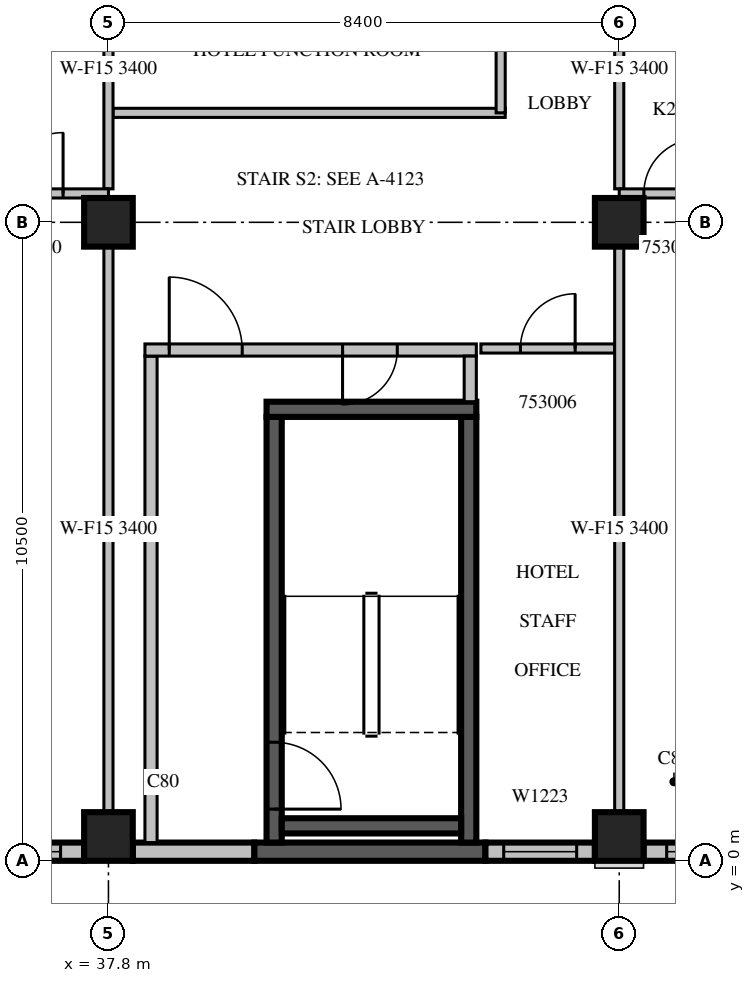
"""IFC4 building model, lengths in metres.
Left out: names, types, materials, properties, quantities, classifications, styles, units other than length and angle.
Written with IfcOpenShell. Run it as: python <this file> out.ifc"""

import sys

from ifc_helpers import new_model, si_unit, direction, frame, frame_2d, origin, origin_2d, place, context, subcontext, project, spatial, rectangle, extrude, source, transform, mapped, element, fill, save


model = new_model("IFC4")
c1 = context("Model", 3, precision=1e-05, world=origin(), true_north=direction((0.0, 1.0)))
c2 = subcontext(c1, "Body", "Model", "MODEL_VIEW")
j1 = project(units=[si_unit("LENGTHUNIT", "METRE"), si_unit("PLANEANGLEUNIT", "RADIAN")], contexts=[c1])
p1 = place(None, origin())
s1 = spatial("IfcSite", under=j1, at=p1, CompositionType="ELEMENT")
p2 = place(p1, origin())
s2 = spatial("IfcBuilding", under=s1, at=p2, CompositionType="ELEMENT")
p3 = place(p2, frame((0.0, 0.0, 234.8)))
s3 = spatial("IfcBuildingStorey", under=s2, at=p3, CompositionType="ELEMENT", Elevation=234.8)
m1 = source(origin(), c2, "Body", "SweptSolid", [
    extrude(rectangle(XDim=0.8, YDim=0.8, at=origin_2d()), origin(), (0.0, 0.0, 1.0), 3.8),
])
for number, where, z_axis, x_axis in (
    (1, (37.8, 0.4, 0.0), (0.0, 0.0, 1.0), (1.0, 0.0, 0.0)),
    (2, (46.2, 0.4, 0.0), (0.0, 0.0, 1.0), (1.0, 0.0, 0.0)),
    (3, (37.8, 10.5, 0.0), (0.0, 0.0, 1.0), (1.0, 0.0, 0.0)),
    (4, (46.2, 10.5, 0.0), (0.0, 0.0, 1.0), (1.0, 0.0, 0.0)),
):
    element("IfcColumn", number, at=place(p3, frame(where, z_axis=z_axis, x_axis=x_axis)), inside=s3, PredefinedType="COLUMN", context=c2, shape_type="MappedRepresentation", body=[
        mapped(m1, transform((0.0, 0.0, 0.0), scale=1.0)),
    ])
m2 = source(origin(), c2, "Body", "SweptSolid", [
    extrude(rectangle(XDim=7.6, YDim=0.3, at=frame_2d((3.8, 0.0))), origin(), (0.0, 0.0, 1.0), 3.4),
])
p4 = place(p3, frame((29.8, 0.15, 0.0), z_axis=(0.0, 0.0, 1.0), x_axis=(1.0, 0.0, 0.0)))
e5 = element("IfcWall", 5, at=p4, inside=s3, PredefinedType="STANDARD", context=c2, shape_type="MappedRepresentation", body=[
    mapped(m2, transform((0.0, 0.0, 0.0), scale=1.0)),
])
m3 = source(origin(), c2, "Body", "SweptSolid", [
    extrude(rectangle(XDim=1.2, YDim=2.3, at=frame_2d((0.6, 1.15))), frame((0.0, 0.16, 0.0), z_axis=(0.0, -1.0, 0.0), x_axis=(1.0, 0.0, 0.0)), (0.0, 0.0, 1.0), 0.32),
])
p5 = place(p4, frame((0.487, 0.0, 0.6)))
e6 = element("IfcOpeningElement", 6, at=p5, cuts=e5, PredefinedType="OPENING", context=c2, shape_type="MappedRepresentation", body=[
    mapped(m3, transform((0.0, 0.0, 0.0), scale=1.0)),
])
p6 = place(p4, frame((6.013, 0.0, 0.6)))
e7 = element("IfcOpeningElement", 7, at=p6, cuts=e5, PredefinedType="OPENING", context=c2, shape_type="MappedRepresentation", body=[
    mapped(m3, transform((0.0, 0.0, 0.0), scale=1.0)),
])
m4 = source(origin(), c2, "Body", "SweptSolid", [
    extrude(rectangle(XDim=2.4, YDim=2.3, at=frame_2d((1.2, 1.15))), frame((0.0, 0.16, 0.0), z_axis=(0.0, -1.0, 0.0), x_axis=(1.0, 0.0, 0.0)), (0.0, 0.0, 1.0), 0.32),
])
p7 = place(p4, frame((2.65, 0.0, 0.6)))
e8 = element("IfcOpeningElement", 8, at=p7, cuts=e5, PredefinedType="OPENING", context=c2, shape_type="MappedRepresentation", body=[
    mapped(m4, transform((0.0, 0.0, 0.0), scale=1.0)),
])
m5 = source(origin(), c2, "Body", "SweptSolid", [
    extrude(rectangle(XDim=2.0, YDim=0.3, at=frame_2d((1.0, 0.0))), origin(), (0.0, 0.0, 1.0), 3.4),
])
p8 = place(p3, frame((38.2, 0.15, 0.0), z_axis=(0.0, 0.0, 1.0), x_axis=(1.0, 0.0, 0.0)))
e9 = element("IfcWall", 9, at=p8, inside=s3, PredefinedType="STANDARD", context=c2, shape_type="MappedRepresentation", body=[
    mapped(m5, transform((0.0, 0.0, 0.0), scale=1.0)),
])
m6 = source(origin(), c2, "Body", "SweptSolid", [
    extrude(rectangle(XDim=3.8, YDim=0.3, at=frame_2d((1.9, 0.0))), origin(), (0.0, 0.0, 1.0), 3.4),
])
p9 = place(p3, frame((40.2, 0.15, 0.0), z_axis=(0.0, 0.0, 1.0), x_axis=(1.0, 0.0, 0.0)))
e10 = element("IfcWall", 10, at=p9, inside=s3, PredefinedType="SOLIDWALL", context=c2, shape_type="MappedRepresentation", body=[
    mapped(m6, transform((0.0, 0.0, 0.0), scale=1.0)),
])
m7 = source(origin(), c2, "Body", "SweptSolid", [
    extrude(rectangle(XDim=1.8, YDim=0.3, at=frame_2d((0.9, 0.0))), origin(), (0.0, 0.0, 1.0), 3.4),
])
p10 = place(p3, frame((44.0, 0.15, 0.0), z_axis=(0.0, 0.0, 1.0), x_axis=(1.0, 0.0, 0.0)))
e11 = element("IfcWall", 11, at=p10, inside=s3, PredefinedType="STANDARD", context=c2, shape_type="MappedRepresentation", body=[
    mapped(m7, transform((0.0, 0.0, 0.0), scale=1.0)),
])
p11 = place(p10, frame((0.3, 0.0, 0.6)))
e12 = element("IfcOpeningElement", 12, at=p11, cuts=e11, PredefinedType="OPENING", context=c2, shape_type="MappedRepresentation", body=[
    mapped(m3, transform((0.0, 0.0, 0.0), scale=1.0)),
])
m8 = source(origin(), c2, "Body", "SweptSolid", [
    extrude(rectangle(XDim=2.96, YDim=0.3, at=frame_2d((1.48, 0.0))), origin(), (0.0, 0.0, 1.0), 3.4),
])
p12 = place(p3, frame((46.6, 0.15, 0.0), z_axis=(0.0, 0.0, 1.0), x_axis=(1.0, 0.0, 0.0)))
e13 = element("IfcWall", 13, at=p12, inside=s3, PredefinedType="STANDARD", context=c2, shape_type="MappedRepresentation", body=[
    mapped(m8, transform((0.0, 0.0, 0.0), scale=1.0)),
])
m9 = source(origin(), c2, "Body", "SweptSolid", [
    extrude(rectangle(XDim=1.8, YDim=2.3, at=frame_2d((0.9, 1.15))), frame((0.0, 0.16, 0.0), z_axis=(0.0, -1.0, 0.0), x_axis=(1.0, 0.0, 0.0)), (0.0, 0.0, 1.0), 0.32),
])
p13 = place(p12, frame((0.38, 0.0, 0.6)))
e14 = element("IfcOpeningElement", 14, at=p13, cuts=e13, PredefinedType="OPENING", context=c2, shape_type="MappedRepresentation", body=[
    mapped(m9, transform((0.0, 0.0, 0.0), scale=1.0)),
])
m10 = source(origin(), c2, "Body", "SweptSolid", [
    extrude(rectangle(XDim=7.0, YDim=0.25, at=frame_2d((3.5, 0.0))), origin(), (0.0, 0.0, 1.0), 3.4),
])
p14 = place(p3, frame((40.525, 0.3, 0.0), z_axis=(0.0, 0.0, 1.0), x_axis=(0.0, 1.0, 0.0)))
e15 = element("IfcWall", 15, at=p14, inside=s3, PredefinedType="SOLIDWALL", context=c2, shape_type="MappedRepresentation", body=[
    mapped(m10, transform((0.0, 0.0, 0.0), scale=1.0)),
])
m11 = source(origin(), c2, "Body", "SweptSolid", [
    extrude(rectangle(XDim=1.1, YDim=2.1, at=frame_2d((0.55, 1.05))), frame((0.0, 0.135, 0.0), z_axis=(0.0, -1.0, 0.0), x_axis=(1.0, 0.0, 0.0)), (0.0, 0.0, 1.0), 0.27),
])
p15 = place(p14, frame((0.55, 0.0, 0.0)))
e16 = element("IfcOpeningElement", 16, at=p15, cuts=e15, PredefinedType="OPENING", context=c2, shape_type="MappedRepresentation", body=[
    mapped(m11, transform((0.0, 0.0, 0.0), scale=1.0)),
])
p16 = place(p3, frame((43.725, 0.3, 0.0), z_axis=(0.0, 0.0, 1.0), x_axis=(0.0, 1.0, 0.0)))
e17 = element("IfcWall", 17, at=p16, inside=s3, PredefinedType="SOLIDWALL", context=c2, shape_type="MappedRepresentation", body=[
    mapped(m10, transform((0.0, 0.0, 0.0), scale=1.0)),
])
m12 = source(origin(), c2, "Body", "SweptSolid", [
    extrude(rectangle(XDim=3.45, YDim=0.25, at=frame_2d((1.725, 0.0))), origin(), (0.0, 0.0, 1.0), 3.4),
])
p17 = place(p3, frame((40.4, 7.425, 0.0), z_axis=(0.0, 0.0, 1.0), x_axis=(1.0, 0.0, 0.0)))
e18 = element("IfcWall", 18, at=p17, inside=s3, PredefinedType="SOLIDWALL", context=c2, shape_type="MappedRepresentation", body=[
    mapped(m12, transform((0.0, 0.0, 0.0), scale=1.0)),
])
m13 = source(origin(), c2, "Body", "SweptSolid", [
    extrude(rectangle(XDim=2.95, YDim=0.25, at=frame_2d((1.475, 0.0))), origin(), (0.0, 0.0, 1.0), 3.4),
])
p18 = place(p3, frame((40.65, 0.575, 0.0), z_axis=(0.0, 0.0, 1.0), x_axis=(1.0, 0.0, 0.0)))
e19 = element("IfcWall", 19, at=p18, inside=s3, PredefinedType="SOLIDWALL", context=c2, shape_type="MappedRepresentation", body=[
    mapped(m13, transform((0.0, 0.0, 0.0), scale=1.0)),
])
m14 = source(origin(), c2, "Body", "SweptSolid", [
    extrude(rectangle(XDim=8.0, YDim=0.2, at=frame_2d((4.0, 0.0))), origin(), (0.0, 0.0, 1.0), 3.4),
])
p19 = place(p3, frame((38.5, 0.3, 0.0), z_axis=(0.0, 0.0, 1.0), x_axis=(0.0, 1.0, 0.0)))
e20 = element("IfcWall", 20, at=p19, inside=s3, PredefinedType="PARTITIONING", context=c2, shape_type="MappedRepresentation", body=[
    mapped(m14, transform((0.0, 0.0, 0.0), scale=1.0)),
])
m15 = source(origin(), c2, "Body", "SweptSolid", [
    extrude(rectangle(XDim=5.45, YDim=0.2, at=frame_2d((2.725, 0.0))), origin(), (0.0, 0.0, 1.0), 3.4),
])
p20 = place(p3, frame((38.4, 8.4, 0.0), z_axis=(0.0, 0.0, 1.0), x_axis=(1.0, 0.0, 0.0)))
e21 = element("IfcWall", 21, at=p20, inside=s3, PredefinedType="PARTITIONING", context=c2, shape_type="MappedRepresentation", body=[
    mapped(m15, transform((0.0, 0.0, 0.0), scale=1.0)),
])
m16 = source(origin(), c2, "Body", "SweptSolid", [
    extrude(rectangle(XDim=1.2, YDim=2.1, at=frame_2d((0.6, 1.05))), frame((0.0, 0.11, 0.0), z_axis=(0.0, -1.0, 0.0), x_axis=(1.0, 0.0, 0.0)), (0.0, 0.0, 1.0), 0.22),
])
p21 = place(p20, frame((0.4, 0.0, 0.0)))
e22 = element("IfcOpeningElement", 22, at=p21, cuts=e21, PredefinedType="OPENING", context=c2, shape_type="MappedRepresentation", body=[
    mapped(m16, transform((0.0, 0.0, 0.0), scale=1.0)),
])
m17 = source(origin(), c2, "Body", "SweptSolid", [
    extrude(rectangle(XDim=0.9, YDim=2.1, at=frame_2d((0.45, 1.05))), frame((0.0, 0.11, 0.0), z_axis=(0.0, -1.0, 0.0), x_axis=(1.0, 0.0, 0.0)), (0.0, 0.0, 1.0), 0.22),
])
p22 = place(p20, frame((3.25, 0.0, 0.0)))
e23 = element("IfcOpeningElement", 23, at=p22, cuts=e21, PredefinedType="OPENING", context=c2, shape_type="MappedRepresentation", body=[
    mapped(m17, transform((0.0, 0.0, 0.0), scale=1.0)),
])
m18 = source(origin(), c2, "Body", "SweptSolid", [
    extrude(rectangle(XDim=0.75, YDim=0.2, at=frame_2d((0.375, 0.0))), origin(), (0.0, 0.0, 1.0), 3.4),
])
p23 = place(p3, frame((43.75, 7.55, 0.0), z_axis=(0.0, 0.0, 1.0), x_axis=(0.0, 1.0, 0.0)))
e24 = element("IfcWall", 24, at=p23, inside=s3, PredefinedType="PARTITIONING", context=c2, shape_type="MappedRepresentation", body=[
    mapped(m18, transform((0.0, 0.0, 0.0), scale=1.0)),
])
m19 = source(origin(), c2, "Body", "SweptSolid", [
    extrude(rectangle(XDim=6.45, YDim=0.15, at=frame_2d((3.225, 0.0))), origin(), (0.0, 0.0, 1.0), 3.4),
])
p24 = place(p3, frame((37.875, 12.3, 0.0), z_axis=(0.0, 0.0, 1.0), x_axis=(1.0, 0.0, 0.0)))
e25 = element("IfcWall", 25, at=p24, inside=s3, PredefinedType="PARTITIONING", context=c2, shape_type="MappedRepresentation", body=[
    mapped(m19, transform((0.0, 0.0, 0.0), scale=1.0)),
])
m20 = source(origin(), c2, "Body", "SweptSolid", [
    extrude(rectangle(XDim=2.775, YDim=0.15, at=frame_2d((1.387, 0.0))), origin(), (0.0, 0.0, 1.0), 3.4),
])
p25 = place(p3, frame((44.25, 12.3, 0.0), z_axis=(0.0, 0.0, 1.0), x_axis=(0.0, 1.0, 0.0)))
e26 = element("IfcWall", 26, at=p25, inside=s3, PredefinedType="PARTITIONING", context=c2, shape_type="MappedRepresentation", body=[
    mapped(m20, transform((0.0, 0.0, 0.0), scale=1.0)),
])
m21 = source(origin(), c2, "Body", "SweptSolid", [
    extrude(rectangle(XDim=2.2, YDim=0.15, at=frame_2d((1.1, 0.0))), origin(), (0.0, 0.0, 1.0), 3.4),
])
p26 = place(p3, frame((46.125, 8.425, 0.0), z_axis=(0.0, 0.0, 1.0), x_axis=(-1.0, 0.0, 0.0)))
e27 = element("IfcWall", 27, at=p26, inside=s3, PredefinedType="PARTITIONING", context=c2, shape_type="MappedRepresentation", body=[
    mapped(m21, transform((0.0, 0.0, 0.0), scale=1.0)),
])
m22 = source(origin(), c2, "Body", "SweptSolid", [
    extrude(rectangle(XDim=0.9, YDim=2.1, at=frame_2d((0.45, 1.05))), frame((0.0, 0.085, 0.0), z_axis=(0.0, -1.0, 0.0), x_axis=(1.0, 0.0, 0.0)), (0.0, 0.0, 1.0), 0.17),
])
p27 = place(p26, frame((0.65, 0.0, 0.0)))
e28 = element("IfcOpeningElement", 28, at=p27, cuts=e27, PredefinedType="OPENING", context=c2, shape_type="MappedRepresentation", body=[
    mapped(m22, transform((0.0, 0.0, 0.0), scale=1.0)),
])
m23 = source(origin(), c2, "Body", "SweptSolid", [
    extrude(rectangle(XDim=9.302, YDim=0.15, at=frame_2d((4.651, 0.0))), origin(), (0.0, 0.0, 1.0), 3.4),
])
p28 = place(p3, frame((37.8, 0.799, 0.0), z_axis=(0.0, 0.0, 1.0), x_axis=(0.0, 1.0, 0.0)))
e29 = element("IfcWall", 29, at=p28, inside=s3, PredefinedType="PARTITIONING", context=c2, shape_type="MappedRepresentation", body=[
    mapped(m23, transform((0.0, 0.0, 0.0), scale=1.0)),
])
m24 = source(origin(), c2, "Body", "SweptSolid", [
    extrude(rectangle(XDim=3.95, YDim=0.15, at=frame_2d((1.975, 0.0))), origin(), (0.0, 0.0, 1.0), 3.4),
])
p29 = place(p3, frame((37.8, 11.05, 0.0), z_axis=(0.0, 0.0, 1.0), x_axis=(0.0, 1.0, 0.0)))
e30 = element("IfcWall", 30, at=p29, inside=s3, PredefinedType="PARTITIONING", context=c2, shape_type="MappedRepresentation", body=[
    mapped(m24, transform((0.0, 0.0, 0.0), scale=1.0)),
])
m25 = source(origin(), c2, "Body", "SweptSolid", [
    extrude(rectangle(XDim=8.4, YDim=0.15, at=frame_2d((4.2, 0.0))), origin(), (0.0, 0.0, 1.0), 3.4),
])
p30 = place(p3, frame((37.8, 10.975, 0.0), z_axis=(0.0, 0.0, 1.0), x_axis=(-1.0, 0.0, 0.0)))
e31 = element("IfcWall", 31, at=p30, inside=s3, PredefinedType="PARTITIONING", context=c2, shape_type="MappedRepresentation", body=[
    mapped(m25, transform((0.0, 0.0, 0.0), scale=1.0)),
])
m26 = source(origin(), c2, "Body", "SweptSolid", [
    extrude(rectangle(XDim=1.6, YDim=2.1, at=frame_2d((0.8, 1.05))), frame((0.0, 0.085, 0.0), z_axis=(0.0, -1.0, 0.0), x_axis=(1.0, 0.0, 0.0)), (0.0, 0.0, 1.0), 0.17),
])
p31 = place(p30, frame((5.376, 0.0, 0.0)))
e32 = element("IfcOpeningElement", 32, at=p31, cuts=e31, PredefinedType="OPENING", context=c2, shape_type="MappedRepresentation", body=[
    mapped(m26, transform((0.0, 0.0, 0.0), scale=1.0)),
])
m27 = source(origin(), c2, "Body", "SweptSolid", [
    extrude(rectangle(XDim=1.0, YDim=2.1, at=frame_2d((0.5, 1.05))), frame((0.0, 0.085, 0.0), z_axis=(0.0, -1.0, 0.0), x_axis=(1.0, 0.0, 0.0)), (0.0, 0.0, 1.0), 0.17),
])
p32 = place(p30, frame((2.722, 0.0, 0.0)))
e33 = element("IfcOpeningElement", 33, at=p32, cuts=e31, PredefinedType="OPENING", context=c2, shape_type="MappedRepresentation", body=[
    mapped(m27, transform((0.0, 0.0, 0.0), scale=1.0)),
])
p33 = place(p30, frame((0.746, 0.0, 0.0)))
e34 = element("IfcOpeningElement", 34, at=p33, cuts=e31, PredefinedType="OPENING", context=c2, shape_type="MappedRepresentation", body=[
    mapped(m27, transform((0.0, 0.0, 0.0), scale=1.0)),
])
p34 = place(p3, frame((46.2, 0.799, 0.0), z_axis=(0.0, 0.0, 1.0), x_axis=(0.0, 1.0, 0.0)))
e35 = element("IfcWall", 35, at=p34, inside=s3, PredefinedType="PARTITIONING", context=c2, shape_type="MappedRepresentation", body=[
    mapped(m23, transform((0.0, 0.0, 0.0), scale=1.0)),
])
p35 = place(p3, frame((46.2, 11.05, 0.0), z_axis=(0.0, 0.0, 1.0), x_axis=(0.0, 1.0, 0.0)))
e36 = element("IfcWall", 36, at=p35, inside=s3, PredefinedType="PARTITIONING", context=c2, shape_type="MappedRepresentation", body=[
    mapped(m24, transform((0.0, 0.0, 0.0), scale=1.0)),
])
m28 = source(origin(), c2, "Body", "SweptSolid", [
    extrude(rectangle(XDim=7.26, YDim=0.15, at=frame_2d((3.63, 0.0))), origin(), (0.0, 0.0, 1.0), 3.4),
])
p36 = place(p3, frame((53.46, 10.975, 0.0), z_axis=(0.0, 0.0, 1.0), x_axis=(-1.0, 0.0, 0.0)))
e37 = element("IfcWall", 37, at=p36, inside=s3, PredefinedType="PARTITIONING", context=c2, shape_type="MappedRepresentation", body=[
    mapped(m28, transform((0.0, 0.0, 0.0), scale=1.0)),
])
p37 = place(p36, frame((5.955, 0.0, 0.0)))
e38 = element("IfcOpeningElement", 38, at=p37, cuts=e37, PredefinedType="OPENING", context=c2, shape_type="MappedRepresentation", body=[
    mapped(m22, transform((0.0, 0.0, 0.0), scale=1.0)),
])
p38 = place(p36, frame((4.41, 0.0, 0.0)))
e39 = element("IfcOpeningElement", 39, at=p38, cuts=e37, PredefinedType="OPENING", context=c2, shape_type="MappedRepresentation", body=[
    mapped(m22, transform((0.0, 0.0, 0.0), scale=1.0)),
])
m29 = source(origin(), c2, "Body", "SweptSolid", [
    extrude(rectangle(XDim=1.2, YDim=2.3, at=frame_2d((0.6, 1.15))), frame((0.0, 0.03, 0.0), z_axis=(0.0, -1.0, 0.0), x_axis=(1.0, 0.0, 0.0)), (0.0, 0.0, 1.0), 0.06),
])
p39 = place(p6, origin())
e40 = element("IfcWindow", 40, at=p39, inside=s3, PartitioningType="SINGLE_PANEL", PredefinedType="WINDOW", context=c2, shape_type="MappedRepresentation", body=[
    mapped(m29, transform((0.0, 0.0, 0.0), scale=1.0)),
])
fill(e7, e40)
p40 = place(p11, origin())
e41 = element("IfcWindow", 41, at=p40, inside=s3, PartitioningType="SINGLE_PANEL", PredefinedType="WINDOW", context=c2, shape_type="MappedRepresentation", body=[
    mapped(m29, transform((0.0, 0.0, 0.0), scale=1.0)),
])
fill(e12, e41)
m30 = source(origin(), c2, "Body", "SweptSolid", [
    extrude(rectangle(XDim=1.8, YDim=2.3, at=frame_2d((0.9, 1.15))), frame((0.0, 0.03, 0.0), z_axis=(0.0, -1.0, 0.0), x_axis=(1.0, 0.0, 0.0)), (0.0, 0.0, 1.0), 0.06),
])
p41 = place(p13, origin())
e42 = element("IfcWindow", 42, at=p41, inside=s3, PartitioningType="SINGLE_PANEL", PredefinedType="WINDOW", context=c2, shape_type="MappedRepresentation", body=[
    mapped(m30, transform((0.0, 0.0, 0.0), scale=1.0)),
])
fill(e14, e42)
m31 = source(origin(), c2, "Body", "SweptSolid", [
    extrude(rectangle(XDim=1.1, YDim=2.1, at=frame_2d((0.55, 1.05))), frame((0.0, 0.025, 0.0), z_axis=(0.0, -1.0, 0.0), x_axis=(1.0, 0.0, 0.0)), (0.0, 0.0, 1.0), 0.05),
])
p42 = place(p15, origin())
e43 = element("IfcDoor", 43, at=p42, inside=s3, OperationType="SINGLE_SWING_RIGHT", PredefinedType="DOOR", context=c2, shape_type="MappedRepresentation", body=[
    mapped(m31, transform((0.0, 0.0, 0.0), scale=1.0)),
])
fill(e16, e43)
m32 = source(origin(), c2, "Body", "SweptSolid", [
    extrude(rectangle(XDim=1.2, YDim=2.1, at=frame_2d((0.6, 1.05))), frame((0.0, 0.025, 0.0), z_axis=(0.0, -1.0, 0.0), x_axis=(1.0, 0.0, 0.0)), (0.0, 0.0, 1.0), 0.05),
])
p43 = place(p21, origin())
e44 = element("IfcDoor", 44, at=p43, inside=s3, OperationType="SINGLE_SWING_LEFT", PredefinedType="DOOR", context=c2, shape_type="MappedRepresentation", body=[
    mapped(m32, transform((0.0, 0.0, 0.0), scale=1.0)),
])
fill(e22, e44)
m33 = source(origin(), c2, "Body", "SweptSolid", [
    extrude(rectangle(XDim=0.9, YDim=2.1, at=frame_2d((0.45, 1.05))), frame((0.0, 0.025, 0.0), z_axis=(0.0, -1.0, 0.0), x_axis=(1.0, 0.0, 0.0)), (0.0, 0.0, 1.0), 0.05),
])
p44 = place(p22, origin())
e45 = element("IfcDoor", 45, at=p44, inside=s3, OperationType="SINGLE_SWING_RIGHT", PredefinedType="DOOR", context=c2, shape_type="MappedRepresentation", body=[
    mapped(m33, transform((0.0, 0.0, 0.0), scale=1.0)),
])
fill(e23, e45)
p45 = place(p27, origin())
e46 = element("IfcDoor", 46, at=p45, inside=s3, OperationType="SINGLE_SWING_RIGHT", PredefinedType="DOOR", context=c2, shape_type="MappedRepresentation", body=[
    mapped(m33, transform((0.0, 0.0, 0.0), scale=1.0)),
])
fill(e28, e46)
m34 = source(origin(), c2, "Body", "SweptSolid", [
    extrude(rectangle(XDim=1.0, YDim=2.1, at=frame_2d((0.5, 1.05))), frame((0.0, 0.025, 0.0), z_axis=(0.0, -1.0, 0.0), x_axis=(1.0, 0.0, 0.0)), (0.0, 0.0, 1.0), 0.05),
])
p46 = place(p33, origin())
e47 = element("IfcDoor", 47, at=p46, inside=s3, OperationType="SINGLE_SWING_RIGHT", PredefinedType="DOOR", context=c2, shape_type="MappedRepresentation", body=[
    mapped(m34, transform((0.0, 0.0, 0.0), scale=1.0)),
])
fill(e34, e47)
p47 = place(p37, origin())
e48 = element("IfcDoor", 48, at=p47, inside=s3, OperationType="SINGLE_SWING_RIGHT", PredefinedType="DOOR", context=c2, shape_type="MappedRepresentation", body=[
    mapped(m33, transform((0.0, 0.0, 0.0), scale=1.0)),
])
fill(e38, e48)
save(model, sys.argv[1])
